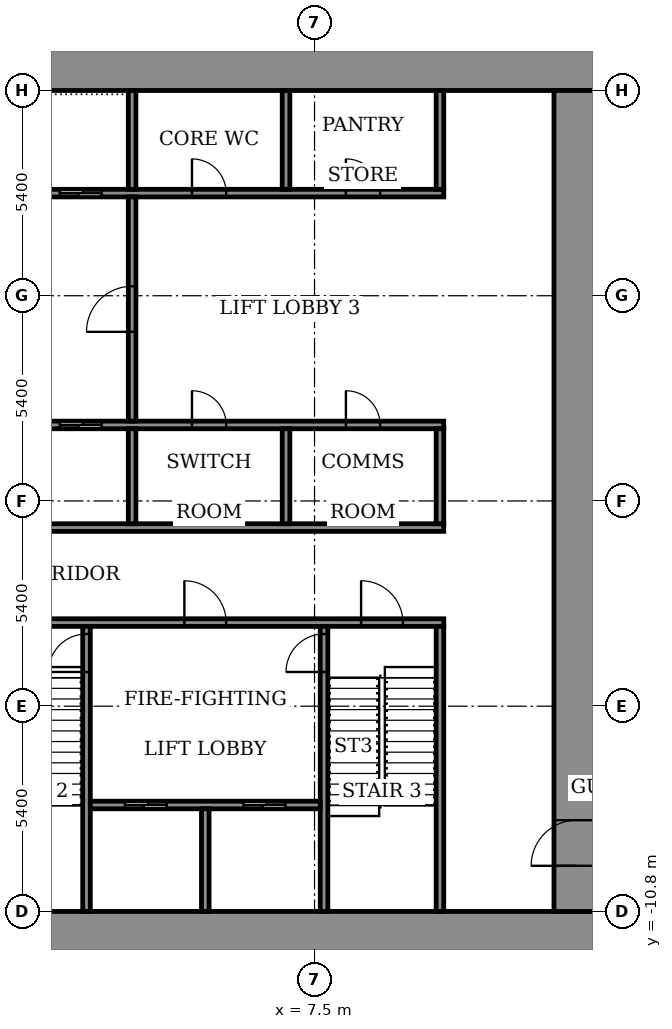
"""IFC4 building model, lengths in metres.
Left out: names, types, materials, properties, quantities, classifications, styles, units other than length and angle.
Written with IfcOpenShell. Run it as: python <this file> out.ifc"""

import sys

from ifc_helpers import new_model, si_unit, direction, frame, frame_2d, origin, place, context, subcontext, project, spatial, rectangle, extrude, element, fill, save


model = new_model("IFC4")
c1 = context("Model", 3, precision=1e-05, world=origin(), true_north=direction((0.0, 1.0)))
c2 = subcontext(c1, "Body", "Model", "MODEL_VIEW")
j1 = project(units=[si_unit("LENGTHUNIT", "METRE"), si_unit("PLANEANGLEUNIT", "RADIAN")], contexts=[c1])
p1 = place(None, origin())
s1 = spatial("IfcSite", under=j1, at=p1, CompositionType="ELEMENT")
p2 = place(p1, origin())
s2 = spatial("IfcBuilding", under=s1, at=p2, CompositionType="ELEMENT")
p3 = place(p2, frame((0.0, 0.0, 29.5)))
s3 = spatial("IfcBuildingStorey", under=s2, at=p3, CompositionType="ELEMENT", Elevation=29.5)
for number, where, z_axis, x_axis in (
    (1, (-15.0, -11.4, 0.0), (0.0, 0.0, 1.0), (1.0, 0.0, 0.0)),
    (2, (-15.0, 11.4, 0.0), (0.0, 0.0, 1.0), (1.0, 0.0, 0.0)),
):
    element("IfcWall", number, at=place(p3, frame(where, z_axis=z_axis, x_axis=x_axis)), inside=s3, PredefinedType="SHEAR", context=c2, shape_type="SweptSolid", body=[
        extrude(rectangle(XDim=30.0, YDim=1.2, at=frame_2d((15.0, 0.0))), origin(), (0.0, 0.0, 1.0), 4.6),
    ])
p4 = place(p3, frame((14.4, -10.8, 0.0), z_axis=(0.0, 0.0, 1.0), x_axis=(0.0, 1.0, 0.0)))
e3 = element("IfcWall", 3, at=p4, inside=s3, PredefinedType="SHEAR", context=c2, shape_type="SweptSolid", body=[
    extrude(rectangle(XDim=21.6, YDim=1.2, at=frame_2d((10.8, 0.0))), origin(), (0.0, 0.0, 1.0), 4.6),
])
p5 = place(p4, frame((1.2, 0.0, 0.0)))
e4 = element("IfcOpeningElement", 4, at=p5, cuts=e3, PredefinedType="OPENING", context=c2, shape_type="SweptSolid", body=[
    extrude(rectangle(XDim=1.2, YDim=2.1, at=frame_2d((0.6, 1.05))), frame((0.0, 0.61, 0.0), z_axis=(0.0, -1.0, 0.0), x_axis=(1.0, 0.0, 0.0)), (0.0, 0.0, 1.0), 1.22),
])
p6 = place(p3, frame((-10.9, -3.2, 0.0), z_axis=(0.0, 0.0, 1.0), x_axis=(1.0, 0.0, 0.0)))
e5 = element("IfcWall", 5, at=p6, inside=s3, PredefinedType="SHEAR", context=c2, shape_type="SweptSolid", body=[
    extrude(rectangle(XDim=21.8, YDim=0.2, at=frame_2d((10.9, 0.0))), origin(), (0.0, 0.0, 1.0), 4.05),
])
p7 = place(p6, frame((1.075, 0.0, 0.0)))
e6 = element("IfcOpeningElement", 6, at=p7, cuts=e5, PredefinedType="OPENING", context=c2, shape_type="SweptSolid", body=[
    extrude(rectangle(XDim=1.1, YDim=2.1, at=frame_2d((0.55, 1.05))), frame((0.0, 0.11, 0.0), z_axis=(0.0, -1.0, 0.0), x_axis=(1.0, 0.0, 0.0)), (0.0, 0.0, 1.0), 0.22),
])
p8 = place(p6, frame((10.325, 0.0, 0.0)))
e7 = element("IfcOpeningElement", 7, at=p8, cuts=e5, PredefinedType="OPENING", context=c2, shape_type="SweptSolid", body=[
    extrude(rectangle(XDim=1.1, YDim=2.1, at=frame_2d((0.55, 1.05))), frame((0.0, 0.11, 0.0), z_axis=(0.0, -1.0, 0.0), x_axis=(1.0, 0.0, 0.0)), (0.0, 0.0, 1.0), 0.22),
])
p9 = place(p6, frame((19.625, 0.0, 0.0)))
e8 = element("IfcOpeningElement", 8, at=p9, cuts=e5, PredefinedType="OPENING", context=c2, shape_type="SweptSolid", body=[
    extrude(rectangle(XDim=1.1, YDim=2.1, at=frame_2d((0.55, 1.05))), frame((0.0, 0.11, 0.0), z_axis=(0.0, -1.0, 0.0), x_axis=(1.0, 0.0, 0.0)), (0.0, 0.0, 1.0), 0.22),
])
p10 = place(p6, frame((5.7, 0.0, 0.0)))
e9 = element("IfcOpeningElement", 9, at=p10, cuts=e5, PredefinedType="OPENING", context=c2, shape_type="SweptSolid", body=[
    extrude(rectangle(XDim=1.1, YDim=2.1, at=frame_2d((0.55, 1.05))), frame((0.0, 0.11, 0.0), z_axis=(0.0, -1.0, 0.0), x_axis=(1.0, 0.0, 0.0)), (0.0, 0.0, 1.0), 0.22),
])
p11 = place(p6, frame((14.975, 0.0, 0.0)))
e10 = element("IfcOpeningElement", 10, at=p11, cuts=e5, PredefinedType="OPENING", context=c2, shape_type="SweptSolid", body=[
    extrude(rectangle(XDim=1.1, YDim=2.1, at=frame_2d((0.55, 1.05))), frame((0.0, 0.11, 0.0), z_axis=(0.0, -1.0, 0.0), x_axis=(1.0, 0.0, 0.0)), (0.0, 0.0, 1.0), 0.22),
])
p12 = place(p3, frame((-10.9, -0.7, 0.0), z_axis=(0.0, 0.0, 1.0), x_axis=(1.0, 0.0, 0.0)))
e11 = element("IfcWall", 11, at=p12, inside=s3, PredefinedType="SHEAR", context=c2, shape_type="SweptSolid", body=[
    extrude(rectangle(XDim=21.8, YDim=0.2, at=frame_2d((10.9, 0.0))), origin(), (0.0, 0.0, 1.0), 4.05),
])
p13 = place(p3, frame((-10.9, 2.0, 0.0), z_axis=(0.0, 0.0, 1.0), x_axis=(1.0, 0.0, 0.0)))
e12 = element("IfcWall", 12, at=p13, inside=s3, PredefinedType="SHEAR", context=c2, shape_type="SweptSolid", body=[
    extrude(rectangle(XDim=21.8, YDim=0.2, at=frame_2d((10.9, 0.0))), origin(), (0.0, 0.0, 1.0), 4.05),
])
p14 = place(p13, frame((0.9, 0.0, 0.0)))
e13 = element("IfcOpeningElement", 13, at=p14, cuts=e12, PredefinedType="OPENING", context=c2, shape_type="SweptSolid", body=[
    extrude(rectangle(XDim=1.1, YDim=2.1, at=frame_2d((0.55, 1.05))), frame((0.0, 0.11, 0.0), z_axis=(0.0, -1.0, 0.0), x_axis=(1.0, 0.0, 0.0)), (0.0, 0.0, 1.0), 0.22),
])
p15 = place(p13, frame((3.6, 0.0, 0.0)))
e14 = element("IfcOpeningElement", 14, at=p15, cuts=e12, PredefinedType="OPENING", context=c2, shape_type="SweptSolid", body=[
    extrude(rectangle(XDim=1.1, YDim=2.1, at=frame_2d((0.55, 1.05))), frame((0.0, 0.11, 0.0), z_axis=(0.0, -1.0, 0.0), x_axis=(1.0, 0.0, 0.0)), (0.0, 0.0, 1.0), 0.22),
])
p16 = place(p13, frame((6.3, 0.0, 0.0)))
e15 = element("IfcOpeningElement", 15, at=p16, cuts=e12, PredefinedType="OPENING", context=c2, shape_type="SweptSolid", body=[
    extrude(rectangle(XDim=1.1, YDim=2.1, at=frame_2d((0.55, 1.05))), frame((0.0, 0.11, 0.0), z_axis=(0.0, -1.0, 0.0), x_axis=(1.0, 0.0, 0.0)), (0.0, 0.0, 1.0), 0.22),
])
p17 = place(p13, frame((9.0, 0.0, 0.0)))
e16 = element("IfcOpeningElement", 16, at=p17, cuts=e12, PredefinedType="OPENING", context=c2, shape_type="SweptSolid", body=[
    extrude(rectangle(XDim=1.1, YDim=2.1, at=frame_2d((0.55, 1.05))), frame((0.0, 0.11, 0.0), z_axis=(0.0, -1.0, 0.0), x_axis=(1.0, 0.0, 0.0)), (0.0, 0.0, 1.0), 0.22),
])
p18 = place(p13, frame((11.7, 0.0, 0.0)))
e17 = element("IfcOpeningElement", 17, at=p18, cuts=e12, PredefinedType="OPENING", context=c2, shape_type="SweptSolid", body=[
    extrude(rectangle(XDim=1.1, YDim=2.1, at=frame_2d((0.55, 1.05))), frame((0.0, 0.11, 0.0), z_axis=(0.0, -1.0, 0.0), x_axis=(1.0, 0.0, 0.0)), (0.0, 0.0, 1.0), 0.22),
])
p19 = place(p13, frame((15.175, 0.0, 0.0)))
e18 = element("IfcOpeningElement", 18, at=p19, cuts=e12, PredefinedType="OPENING", context=c2, shape_type="SweptSolid", body=[
    extrude(rectangle(XDim=0.9, YDim=2.1, at=frame_2d((0.45, 1.05))), frame((0.0, 0.11, 0.0), z_axis=(0.0, -1.0, 0.0), x_axis=(1.0, 0.0, 0.0)), (0.0, 0.0, 1.0), 0.22),
])
p20 = place(p13, frame((19.225, 0.0, 0.0)))
e19 = element("IfcOpeningElement", 19, at=p20, cuts=e12, PredefinedType="OPENING", context=c2, shape_type="SweptSolid", body=[
    extrude(rectangle(XDim=0.9, YDim=2.1, at=frame_2d((0.45, 1.05))), frame((0.0, 0.11, 0.0), z_axis=(0.0, -1.0, 0.0), x_axis=(1.0, 0.0, 0.0)), (0.0, 0.0, 1.0), 0.22),
])
p21 = place(p3, frame((-10.9, 8.1, 0.0), z_axis=(0.0, 0.0, 1.0), x_axis=(1.0, 0.0, 0.0)))
e20 = element("IfcWall", 20, at=p21, inside=s3, PredefinedType="SHEAR", context=c2, shape_type="SweptSolid", body=[
    extrude(rectangle(XDim=21.8, YDim=0.2, at=frame_2d((10.9, 0.0))), origin(), (0.0, 0.0, 1.0), 4.05),
])
p22 = place(p21, frame((0.9, 0.0, 0.0)))
e21 = element("IfcOpeningElement", 21, at=p22, cuts=e20, PredefinedType="OPENING", context=c2, shape_type="SweptSolid", body=[
    extrude(rectangle(XDim=1.1, YDim=2.1, at=frame_2d((0.55, 1.05))), frame((0.0, 0.11, 0.0), z_axis=(0.0, -1.0, 0.0), x_axis=(1.0, 0.0, 0.0)), (0.0, 0.0, 1.0), 0.22),
])
p23 = place(p21, frame((3.6, 0.0, 0.0)))
e22 = element("IfcOpeningElement", 22, at=p23, cuts=e20, PredefinedType="OPENING", context=c2, shape_type="SweptSolid", body=[
    extrude(rectangle(XDim=1.1, YDim=2.1, at=frame_2d((0.55, 1.05))), frame((0.0, 0.11, 0.0), z_axis=(0.0, -1.0, 0.0), x_axis=(1.0, 0.0, 0.0)), (0.0, 0.0, 1.0), 0.22),
])
p24 = place(p21, frame((6.3, 0.0, 0.0)))
e23 = element("IfcOpeningElement", 23, at=p24, cuts=e20, PredefinedType="OPENING", context=c2, shape_type="SweptSolid", body=[
    extrude(rectangle(XDim=1.1, YDim=2.1, at=frame_2d((0.55, 1.05))), frame((0.0, 0.11, 0.0), z_axis=(0.0, -1.0, 0.0), x_axis=(1.0, 0.0, 0.0)), (0.0, 0.0, 1.0), 0.22),
])
p25 = place(p21, frame((9.0, 0.0, 0.0)))
e24 = element("IfcOpeningElement", 24, at=p25, cuts=e20, PredefinedType="OPENING", context=c2, shape_type="SweptSolid", body=[
    extrude(rectangle(XDim=1.1, YDim=2.1, at=frame_2d((0.55, 1.05))), frame((0.0, 0.11, 0.0), z_axis=(0.0, -1.0, 0.0), x_axis=(1.0, 0.0, 0.0)), (0.0, 0.0, 1.0), 0.22),
])
p26 = place(p21, frame((11.7, 0.0, 0.0)))
e25 = element("IfcOpeningElement", 25, at=p26, cuts=e20, PredefinedType="OPENING", context=c2, shape_type="SweptSolid", body=[
    extrude(rectangle(XDim=1.1, YDim=2.1, at=frame_2d((0.55, 1.05))), frame((0.0, 0.11, 0.0), z_axis=(0.0, -1.0, 0.0), x_axis=(1.0, 0.0, 0.0)), (0.0, 0.0, 1.0), 0.22),
])
p27 = place(p21, frame((15.175, 0.0, 0.0)))
e26 = element("IfcOpeningElement", 26, at=p27, cuts=e20, PredefinedType="OPENING", context=c2, shape_type="SweptSolid", body=[
    extrude(rectangle(XDim=0.9, YDim=2.1, at=frame_2d((0.45, 1.05))), frame((0.0, 0.11, 0.0), z_axis=(0.0, -1.0, 0.0), x_axis=(1.0, 0.0, 0.0)), (0.0, 0.0, 1.0), 0.22),
])
p28 = place(p21, frame((19.225, 0.0, 0.0)))
e27 = element("IfcOpeningElement", 27, at=p28, cuts=e20, PredefinedType="OPENING", context=c2, shape_type="SweptSolid", body=[
    extrude(rectangle(XDim=0.9, YDim=2.1, at=frame_2d((0.45, 1.05))), frame((0.0, 0.11, 0.0), z_axis=(0.0, -1.0, 0.0), x_axis=(1.0, 0.0, 0.0)), (0.0, 0.0, 1.0), 0.22),
])
p29 = place(p3, frame((1.5, -10.8, 0.0), z_axis=(0.0, 0.0, 1.0), x_axis=(0.0, 1.0, 0.0)))
e28 = element("IfcWall", 28, at=p29, inside=s3, PredefinedType="SHEAR", context=c2, shape_type="SweptSolid", body=[
    extrude(rectangle(XDim=7.5, YDim=0.2, at=frame_2d((3.75, 0.0))), origin(), (0.0, 0.0, 1.0), 4.05),
])
p30 = place(p29, frame((6.3, 0.0, 0.0)))
e29 = element("IfcOpeningElement", 29, at=p30, cuts=e28, PredefinedType="OPENING", context=c2, shape_type="SweptSolid", body=[
    extrude(rectangle(XDim=1.0, YDim=2.1, at=frame_2d((0.5, 1.05))), frame((0.0, 0.11, 0.0), z_axis=(0.0, -1.0, 0.0), x_axis=(1.0, 0.0, 0.0)), (0.0, 0.0, 1.0), 0.22),
])
p31 = place(p3, frame((7.75, -10.8, 0.0), z_axis=(0.0, 0.0, 1.0), x_axis=(0.0, 1.0, 0.0)))
e30 = element("IfcWall", 30, at=p31, inside=s3, PredefinedType="SHEAR", context=c2, shape_type="SweptSolid", body=[
    extrude(rectangle(XDim=7.5, YDim=0.2, at=frame_2d((3.75, 0.0))), origin(), (0.0, 0.0, 1.0), 4.05),
])
p32 = place(p31, frame((6.3, 0.0, 0.0)))
e31 = element("IfcOpeningElement", 31, at=p32, cuts=e30, PredefinedType="OPENING", context=c2, shape_type="SweptSolid", body=[
    extrude(rectangle(XDim=1.0, YDim=2.1, at=frame_2d((0.5, 1.05))), frame((0.0, 0.11, 0.0), z_axis=(0.0, -1.0, 0.0), x_axis=(1.0, 0.0, 0.0)), (0.0, 0.0, 1.0), 0.22),
])
p33 = place(p3, frame((10.8, -10.8, 0.0), z_axis=(0.0, 0.0, 1.0), x_axis=(0.0, 1.0, 0.0)))
e32 = element("IfcWall", 32, at=p33, inside=s3, PredefinedType="SHEAR", context=c2, shape_type="SweptSolid", body=[
    extrude(rectangle(XDim=7.5, YDim=0.2, at=frame_2d((3.75, 0.0))), origin(), (0.0, 0.0, 1.0), 4.05),
])
p34 = place(p3, frame((1.6, -8.0, 0.0), z_axis=(0.0, 0.0, 1.0), x_axis=(1.0, 0.0, 0.0)))
e33 = element("IfcWall", 33, at=p34, inside=s3, PredefinedType="SHEAR", context=c2, shape_type="SweptSolid", body=[
    extrude(rectangle(XDim=6.05, YDim=0.2, at=frame_2d((3.025, 0.0))), origin(), (0.0, 0.0, 1.0), 4.05),
])
p35 = place(p34, frame((0.913, 0.0, 0.0)))
e34 = element("IfcOpeningElement", 34, at=p35, cuts=e33, PredefinedType="OPENING", context=c2, shape_type="SweptSolid", body=[
    extrude(rectangle(XDim=1.1, YDim=2.1, at=frame_2d((0.55, 1.05))), frame((0.0, 0.11, 0.0), z_axis=(0.0, -1.0, 0.0), x_axis=(1.0, 0.0, 0.0)), (0.0, 0.0, 1.0), 0.22),
])
p36 = place(p34, frame((4.038, 0.0, 0.0)))
e35 = element("IfcOpeningElement", 35, at=p36, cuts=e33, PredefinedType="OPENING", context=c2, shape_type="SweptSolid", body=[
    extrude(rectangle(XDim=1.1, YDim=2.1, at=frame_2d((0.55, 1.05))), frame((0.0, 0.11, 0.0), z_axis=(0.0, -1.0, 0.0), x_axis=(1.0, 0.0, 0.0)), (0.0, 0.0, 1.0), 0.22),
])
p37 = place(p3, frame((4.625, -10.8, 0.0), z_axis=(0.0, 0.0, 1.0), x_axis=(0.0, 1.0, 0.0)))
e36 = element("IfcWall", 36, at=p37, inside=s3, PredefinedType="SHEAR", context=c2, shape_type="SweptSolid", body=[
    extrude(rectangle(XDim=2.7, YDim=0.2, at=frame_2d((1.35, 0.0))), origin(), (0.0, 0.0, 1.0), 4.05),
])
p38 = place(p3, frame((2.7, -0.6, 0.0), z_axis=(0.0, 0.0, 1.0), x_axis=(0.0, 1.0, 0.0)))
e37 = element("IfcWall", 37, at=p38, inside=s3, PredefinedType="SHEAR", context=c2, shape_type="SweptSolid", body=[
    extrude(rectangle(XDim=2.5, YDim=0.2, at=frame_2d((1.25, 0.0))), origin(), (0.0, 0.0, 1.0), 4.05),
])
for number, where, z_axis, x_axis in (
    (38, (6.75, -0.6, 0.0), (0.0, 0.0, 1.0), (0.0, 1.0, 0.0)),
    (39, (10.8, -0.6, 0.0), (0.0, 0.0, 1.0), (0.0, 1.0, 0.0)),
):
    element("IfcWall", number, at=place(p3, frame(where, z_axis=z_axis, x_axis=x_axis)), inside=s3, PredefinedType="STANDARD", context=c2, shape_type="SweptSolid", body=[
        extrude(rectangle(XDim=2.5, YDim=0.2, at=frame_2d((1.25, 0.0))), origin(), (0.0, 0.0, 1.0), 4.05),
    ])
p39 = place(p3, frame((2.7, 8.2, 0.0), z_axis=(0.0, 0.0, 1.0), x_axis=(0.0, 1.0, 0.0)))
e40 = element("IfcWall", 40, at=p39, inside=s3, PredefinedType="SHEAR", context=c2, shape_type="SweptSolid", body=[
    extrude(rectangle(XDim=2.6, YDim=0.2, at=frame_2d((1.3, 0.0))), origin(), (0.0, 0.0, 1.0), 4.05),
])
for number, where, z_axis, x_axis in (
    (41, (6.75, 8.2, 0.0), (0.0, 0.0, 1.0), (0.0, 1.0, 0.0)),
    (42, (10.8, 8.2, 0.0), (0.0, 0.0, 1.0), (0.0, 1.0, 0.0)),
):
    element("IfcWall", number, at=place(p3, frame(where, z_axis=z_axis, x_axis=x_axis)), inside=s3, PredefinedType="STANDARD", context=c2, shape_type="SweptSolid", body=[
        extrude(rectangle(XDim=2.6, YDim=0.2, at=frame_2d((1.3, 0.0))), origin(), (0.0, 0.0, 1.0), 4.05),
    ])
p40 = place(p3, frame((2.7, 2.1, 0.0), z_axis=(0.0, 0.0, 1.0), x_axis=(0.0, 1.0, 0.0)))
e43 = element("IfcWall", 43, at=p40, inside=s3, PredefinedType="STANDARD", context=c2, shape_type="SweptSolid", body=[
    extrude(rectangle(XDim=5.9, YDim=0.2, at=frame_2d((2.95, 0.0))), origin(), (0.0, 0.0, 1.0), 4.05),
])
p41 = place(p40, frame((2.35, 0.0, 0.0)))
e44 = element("IfcOpeningElement", 44, at=p41, cuts=e43, PredefinedType="OPENING", context=c2, shape_type="SweptSolid", body=[
    extrude(rectangle(XDim=1.2, YDim=2.1, at=frame_2d((0.6, 1.05))), frame((0.0, 0.11, 0.0), z_axis=(0.0, -1.0, 0.0), x_axis=(1.0, 0.0, 0.0)), (0.0, 0.0, 1.0), 0.22),
])
p42 = place(p5, origin())
e45 = element("IfcDoor", 45, at=p42, inside=s3, OperationType="DOUBLE_DOOR_SINGLE_SWING", PredefinedType="DOOR", context=c2, shape_type="SweptSolid", body=[
    extrude(rectangle(XDim=1.2, YDim=2.1, at=frame_2d((0.6, 1.05))), frame((0.0, 0.025, 0.0), z_axis=(0.0, -1.0, 0.0), x_axis=(1.0, 0.0, 0.0)), (0.0, 0.0, 1.0), 0.05),
])
fill(e4, e45)
p43 = place(p18, origin())
e46 = element("IfcDoor", 46, at=p43, inside=s3, OperationType="SLIDING_TO_LEFT", PredefinedType="DOOR", context=c2, shape_type="SweptSolid", body=[
    extrude(rectangle(XDim=1.1, YDim=2.1, at=frame_2d((0.55, 1.05))), frame((0.0, 0.025, 0.0), z_axis=(0.0, -1.0, 0.0), x_axis=(1.0, 0.0, 0.0)), (0.0, 0.0, 1.0), 0.05),
])
fill(e17, e46)
p44 = place(p26, origin())
e47 = element("IfcDoor", 47, at=p44, inside=s3, OperationType="SLIDING_TO_LEFT", PredefinedType="DOOR", context=c2, shape_type="SweptSolid", body=[
    extrude(rectangle(XDim=1.1, YDim=2.1, at=frame_2d((0.55, 1.05))), frame((0.0, 0.025, 0.0), z_axis=(0.0, -1.0, 0.0), x_axis=(1.0, 0.0, 0.0)), (0.0, 0.0, 1.0), 0.05),
])
fill(e25, e47)
p45 = place(p19, origin())
e48 = element("IfcDoor", 48, at=p45, inside=s3, OperationType="SINGLE_SWING_LEFT", PredefinedType="DOOR", context=c2, shape_type="SweptSolid", body=[
    extrude(rectangle(XDim=0.9, YDim=2.1, at=frame_2d((0.45, 1.05))), frame((0.0, 0.025, 0.0), z_axis=(0.0, -1.0, 0.0), x_axis=(1.0, 0.0, 0.0)), (0.0, 0.0, 1.0), 0.05),
])
fill(e18, e48)
p46 = place(p20, origin())
e49 = element("IfcDoor", 49, at=p46, inside=s3, OperationType="SINGLE_SWING_LEFT", PredefinedType="DOOR", context=c2, shape_type="SweptSolid", body=[
    extrude(rectangle(XDim=0.9, YDim=2.1, at=frame_2d((0.45, 1.05))), frame((0.0, 0.025, 0.0), z_axis=(0.0, -1.0, 0.0), x_axis=(1.0, 0.0, 0.0)), (0.0, 0.0, 1.0), 0.05),
])
fill(e19, e49)
p47 = place(p27, origin())
e50 = element("IfcDoor", 50, at=p47, inside=s3, OperationType="SINGLE_SWING_RIGHT", PredefinedType="DOOR", context=c2, shape_type="SweptSolid", body=[
    extrude(rectangle(XDim=0.9, YDim=2.1, at=frame_2d((0.45, 1.05))), frame((0.0, 0.025, 0.0), z_axis=(0.0, -1.0, 0.0), x_axis=(1.0, 0.0, 0.0)), (0.0, 0.0, 1.0), 0.05),
])
fill(e26, e50)
p48 = place(p28, origin())
e51 = element("IfcDoor", 51, at=p48, inside=s3, OperationType="SINGLE_SWING_RIGHT", PredefinedType="DOOR", context=c2, shape_type="SweptSolid", body=[
    extrude(rectangle(XDim=0.9, YDim=2.1, at=frame_2d((0.45, 1.05))), frame((0.0, 0.025, 0.0), z_axis=(0.0, -1.0, 0.0), x_axis=(1.0, 0.0, 0.0)), (0.0, 0.0, 1.0), 0.05),
])
fill(e27, e51)
p49 = place(p35, origin())
e52 = element("IfcDoor", 52, at=p49, inside=s3, OperationType="SLIDING_TO_LEFT", PredefinedType="DOOR", context=c2, shape_type="SweptSolid", body=[
    extrude(rectangle(XDim=1.1, YDim=2.1, at=frame_2d((0.55, 1.05))), frame((0.0, 0.025, 0.0), z_axis=(0.0, -1.0, 0.0), x_axis=(1.0, 0.0, 0.0)), (0.0, 0.0, 1.0), 0.05),
])
fill(e34, e52)
p50 = place(p36, origin())
e53 = element("IfcDoor", 53, at=p50, inside=s3, OperationType="SLIDING_TO_LEFT", PredefinedType="DOOR", context=c2, shape_type="SweptSolid", body=[
    extrude(rectangle(XDim=1.1, YDim=2.1, at=frame_2d((0.55, 1.05))), frame((0.0, 0.025, 0.0), z_axis=(0.0, -1.0, 0.0), x_axis=(1.0, 0.0, 0.0)), (0.0, 0.0, 1.0), 0.05),
])
fill(e35, e53)
p51 = place(p9, origin())
e54 = element("IfcDoor", 54, at=p51, inside=s3, OperationType="SINGLE_SWING_RIGHT", PredefinedType="DOOR", context=c2, shape_type="SweptSolid", body=[
    extrude(rectangle(XDim=1.1, YDim=2.1, at=frame_2d((0.55, 1.05))), frame((0.0, 0.025, 0.0), z_axis=(0.0, -1.0, 0.0), x_axis=(1.0, 0.0, 0.0)), (0.0, 0.0, 1.0), 0.05),
])
fill(e8, e54)
p52 = place(p11, origin())
e55 = element("IfcDoor", 55, at=p52, inside=s3, OperationType="SINGLE_SWING_LEFT", PredefinedType="DOOR", context=c2, shape_type="SweptSolid", body=[
    extrude(rectangle(XDim=1.1, YDim=2.1, at=frame_2d((0.55, 1.05))), frame((0.0, 0.025, 0.0), z_axis=(0.0, -1.0, 0.0), x_axis=(1.0, 0.0, 0.0)), (0.0, 0.0, 1.0), 0.05),
])
fill(e10, e55)
p53 = place(p30, origin())
e56 = element("IfcDoor", 56, at=p53, inside=s3, OperationType="SINGLE_SWING_RIGHT", PredefinedType="DOOR", context=c2, shape_type="SweptSolid", body=[
    extrude(rectangle(XDim=1.0, YDim=2.1, at=frame_2d((0.5, 1.05))), frame((0.0, 0.025, 0.0), z_axis=(0.0, -1.0, 0.0), x_axis=(1.0, 0.0, 0.0)), (0.0, 0.0, 1.0), 0.05),
])
fill(e29, e56)
p54 = place(p32, origin())
e57 = element("IfcDoor", 57, at=p54, inside=s3, OperationType="SINGLE_SWING_RIGHT", PredefinedType="DOOR", context=c2, shape_type="SweptSolid", body=[
    extrude(rectangle(XDim=1.0, YDim=2.1, at=frame_2d((0.5, 1.05))), frame((0.0, 0.025, 0.0), z_axis=(0.0, -1.0, 0.0), x_axis=(1.0, 0.0, 0.0)), (0.0, 0.0, 1.0), 0.05),
])
fill(e31, e57)
p55 = place(p41, origin())
e58 = element("IfcDoor", 58, at=p55, inside=s3, OperationType="SINGLE_SWING_LEFT", PredefinedType="DOOR", context=c2, shape_type="SweptSolid", body=[
    extrude(rectangle(XDim=1.2, YDim=2.1, at=frame_2d((0.6, 1.05))), frame((0.0, 0.025, 0.0), z_axis=(0.0, -1.0, 0.0), x_axis=(1.0, 0.0, 0.0)), (0.0, 0.0, 1.0), 0.05),
])
fill(e44, e58)
save(model, sys.argv[1])
